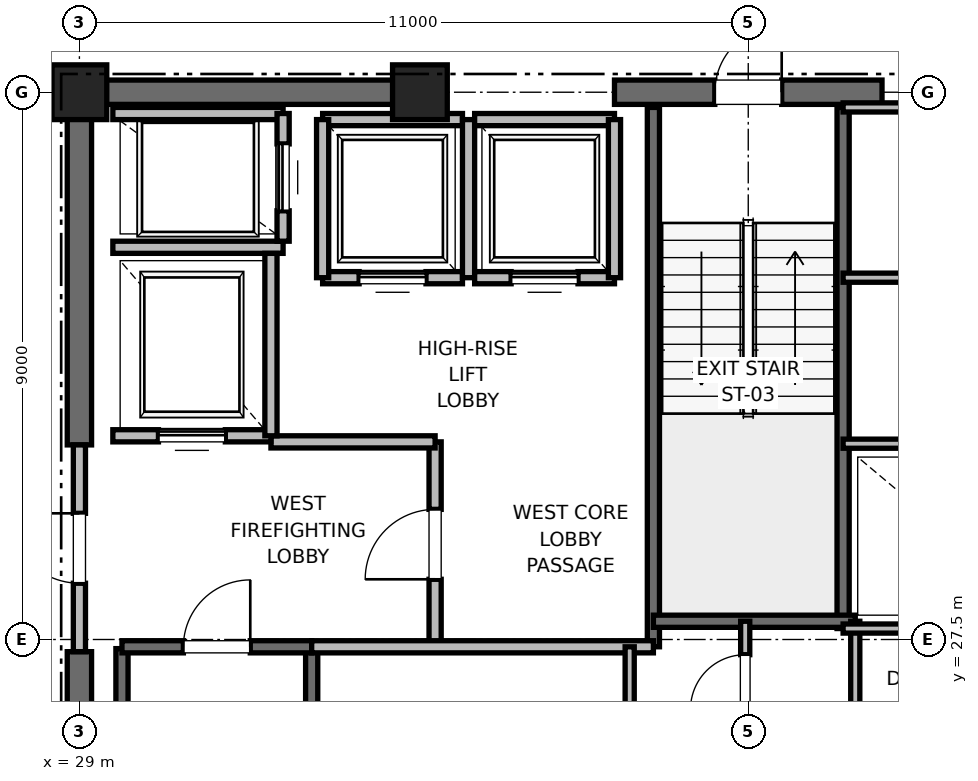
"""IFC4 building model, lengths in metres.
Left out: names, types, materials, properties, quantities, classifications, styles, units other than length and angle.
Written with IfcOpenShell. Run it as: python <this file> out.ifc"""

import sys

from ifc_helpers import new_model, si_unit, direction, frame, frame_2d, origin, origin_2d, place, context, subcontext, project, spatial, rectangle, extrude, element, fill, save


model = new_model("IFC4")
c1 = context("Model", 3, precision=1e-05, world=origin(), true_north=direction((0.0, 1.0)))
c2 = subcontext(c1, "Body", "Model", "MODEL_VIEW")
j1 = project(units=[si_unit("LENGTHUNIT", "METRE"), si_unit("PLANEANGLEUNIT", "RADIAN")], contexts=[c1])
p1 = place(None, origin())
s1 = spatial("IfcSite", under=j1, at=p1, CompositionType="ELEMENT")
p2 = place(p1, origin())
s2 = spatial("IfcBuilding", under=s1, at=p2, CompositionType="ELEMENT")
p3 = place(p2, frame((0.0, 0.0, 322.8)))
s3 = spatial("IfcBuildingStorey", under=s2, at=p3, CompositionType="ELEMENT", Elevation=322.8)
for number, where, z_axis, x_axis in (
    (1, (29.0, 36.5, 0.0), (0.0, 0.0, 1.0), (1.0, 0.0, 0.0)),
    (2, (34.6, 36.5, 0.0), (0.0, 0.0, 1.0), (1.0, 0.0, 0.0)),
):
    element("IfcColumn", number, at=place(p3, frame(where, z_axis=z_axis, x_axis=x_axis)), inside=s3, PredefinedType="PILASTER", context=c2, shape_type="SweptSolid", body=[
        extrude(rectangle(XDim=0.9, YDim=0.9, at=origin_2d()), origin(), (0.0, 0.0, 1.0), 4.0),
    ])
p4 = place(p3, frame((29.0, 36.5, 0.0), z_axis=(0.0, 0.0, 1.0), x_axis=(1.0, 0.0, 0.0)))
e3 = element("IfcWall", 3, at=p4, inside=s3, PredefinedType="SHEAR", context=c2, shape_type="SweptSolid", body=[
    extrude(rectangle(XDim=5.8, YDim=0.4, at=frame_2d((2.9, 0.0))), origin(), (0.0, 0.0, 1.0), 3.785),
])
p5 = place(p3, frame((37.8, 36.5, 0.0), z_axis=(0.0, 0.0, 1.0), x_axis=(1.0, 0.0, 0.0)))
e4 = element("IfcWall", 4, at=p5, inside=s3, PredefinedType="SHEAR", context=c2, shape_type="SweptSolid", body=[
    extrude(rectangle(XDim=4.4, YDim=0.4, at=frame_2d((2.2, 0.0))), origin(), (0.0, 0.0, 1.0), 3.785),
])
p6 = place(p5, frame((1.65, 0.0, 0.0)))
e5 = element("IfcOpeningElement", 5, at=p6, cuts=e4, PredefinedType="OPENING", context=c2, shape_type="SweptSolid", body=[
    extrude(rectangle(XDim=1.1, YDim=2.15, at=frame_2d((0.55, 1.075))), frame((0.0, 0.2, 0.0), z_axis=(0.0, -1.0, 0.0), x_axis=(1.0, 0.0, 0.0)), (0.0, 0.0, 1.0), 0.4),
])
p7 = place(p3, frame((29.0, 18.5, 0.0), z_axis=(0.0, 0.0, 1.0), x_axis=(0.0, 1.0, 0.0)))
e6 = element("IfcWall", 6, at=p7, inside=s3, PredefinedType="SHEAR", context=c2, shape_type="SweptSolid", body=[
    extrude(rectangle(XDim=8.8, YDim=0.4, at=frame_2d((4.4, 0.0))), origin(), (0.0, 0.0, 1.0), 3.785),
])
p8 = place(p3, frame((29.0, 30.7, 0.0), z_axis=(0.0, 0.0, 1.0), x_axis=(0.0, 1.0, 0.0)))
e7 = element("IfcWall", 7, at=p8, inside=s3, PredefinedType="SHEAR", context=c2, shape_type="SweptSolid", body=[
    extrude(rectangle(XDim=5.8, YDim=0.4, at=frame_2d((2.9, 0.0))), origin(), (0.0, 0.0, 1.0), 3.785),
])
p9 = place(p3, frame((29.7, 19.2, 0.0), z_axis=(0.0, 0.0, 1.0), x_axis=(0.0, 1.0, 0.0)))
e8 = element("IfcWall", 8, at=p9, inside=s3, PredefinedType="SOLIDWALL", context=c2, shape_type="SweptSolid", body=[
    extrude(rectangle(XDim=8.15, YDim=0.2, at=frame_2d((4.075, 0.0))), origin(), (0.0, 0.0, 1.0), 3.785),
])
p10 = place(p3, frame((32.82, 18.6, 0.0), z_axis=(0.0, 0.0, 1.0), x_axis=(0.0, 1.0, 0.0)))
e9 = element("IfcWall", 9, at=p10, inside=s3, PredefinedType="SOLIDWALL", context=c2, shape_type="SweptSolid", body=[
    extrude(rectangle(XDim=8.78, YDim=0.2, at=frame_2d((4.39, 0.0))), origin(), (0.0, 0.0, 1.0), 3.785),
])
p11 = place(p3, frame((29.7, 27.38, 0.0), z_axis=(0.0, 0.0, 1.0), x_axis=(1.0, 0.0, 0.0)))
e10 = element("IfcWall", 10, at=p11, inside=s3, PredefinedType="SOLIDWALL", context=c2, shape_type="SweptSolid", body=[
    extrude(rectangle(XDim=3.12, YDim=0.2, at=frame_2d((1.56, 0.0))), origin(), (0.0, 0.0, 1.0), 3.785),
])
p12 = place(p11, frame((1.01, 0.0, 0.0)))
e11 = element("IfcOpeningElement", 11, at=p12, cuts=e10, PredefinedType="OPENING", context=c2, shape_type="SweptSolid", body=[
    extrude(rectangle(XDim=1.1, YDim=2.15, at=frame_2d((0.55, 1.075))), frame((0.0, 0.1, 0.0), z_axis=(0.0, -1.0, 0.0), x_axis=(1.0, 0.0, 0.0)), (0.0, 0.0, 1.0), 0.2),
])
p13 = place(p3, frame((38.44, 27.38, 0.0), z_axis=(0.0, 0.0, 1.0), x_axis=(0.0, 1.0, 0.0)))
e12 = element("IfcWall", 12, at=p13, inside=s3, PredefinedType="SOLIDWALL", context=c2, shape_type="SweptSolid", body=[
    extrude(rectangle(XDim=8.87, YDim=0.2, at=frame_2d((4.435, 0.0))), origin(), (0.0, 0.0, 1.0), 3.785),
])
p14 = place(p3, frame((41.56, 27.68, 0.0), z_axis=(0.0, 0.0, 1.0), x_axis=(0.0, 1.0, 0.0)))
e13 = element("IfcWall", 13, at=p14, inside=s3, PredefinedType="SOLIDWALL", context=c2, shape_type="SweptSolid", body=[
    extrude(rectangle(XDim=8.57, YDim=0.2, at=frame_2d((4.285, 0.0))), origin(), (0.0, 0.0, 1.0), 3.785),
])
p15 = place(p3, frame((38.44, 27.8, 0.0), z_axis=(0.0, 0.0, 1.0), x_axis=(1.0, 0.0, 0.0)))
e14 = element("IfcWall", 14, at=p15, inside=s3, PredefinedType="SOLIDWALL", context=c2, shape_type="SweptSolid", body=[
    extrude(rectangle(XDim=3.32, YDim=0.2, at=frame_2d((1.66, 0.0))), origin(), (0.0, 0.0, 1.0), 3.785),
])
p16 = place(p3, frame((34.85, 27.38, 0.0), z_axis=(0.0, 0.0, 1.0), x_axis=(0.0, 1.0, 0.0)))
e15 = element("IfcWall", 15, at=p16, inside=s3, PredefinedType="PARTITIONING", context=c2, shape_type="SweptSolid", body=[
    extrude(rectangle(XDim=3.37, YDim=0.2, at=frame_2d((1.685, 0.0))), origin(), (0.0, 0.0, 1.0), 3.785),
])
p17 = place(p16, frame((1.11, 0.0, 0.0)))
e16 = element("IfcOpeningElement", 16, at=p17, cuts=e15, PredefinedType="OPENING", context=c2, shape_type="SweptSolid", body=[
    extrude(rectangle(XDim=1.15, YDim=2.2, at=frame_2d((0.575, 1.1))), frame((0.0, 0.1, 0.0), z_axis=(0.0, -1.0, 0.0), x_axis=(1.0, 0.0, 0.0)), (0.0, 0.0, 1.0), 0.2),
])
p18 = place(p3, frame((29.0, 27.3, 0.0), z_axis=(0.0, 0.0, 1.0), x_axis=(0.0, 1.0, 0.0)))
e17 = element("IfcWall", 17, at=p18, inside=s3, PredefinedType="PARTITIONING", context=c2, shape_type="SweptSolid", body=[
    extrude(rectangle(XDim=3.4, YDim=0.2, at=frame_2d((1.7, 0.0))), origin(), (0.0, 0.0, 1.0), 2.865),
])
p19 = place(p18, frame((1.125, 0.0, 0.0)))
e18 = element("IfcOpeningElement", 18, at=p19, cuts=e17, PredefinedType="OPENING", context=c2, shape_type="SweptSolid", body=[
    extrude(rectangle(XDim=1.15, YDim=2.2, at=frame_2d((0.575, 1.1))), frame((0.0, 0.1, 0.0), z_axis=(0.0, -1.0, 0.0), x_axis=(1.0, 0.0, 0.0)), (0.0, 0.0, 1.0), 0.2),
])
p20 = place(p3, frame((32.82, 27.38, 0.0), z_axis=(0.0, 0.0, 1.0), x_axis=(1.0, 0.0, 0.0)))
e19 = element("IfcWall", 19, at=p20, inside=s3, PredefinedType="PARTITIONING", context=c2, shape_type="SweptSolid", body=[
    extrude(rectangle(XDim=5.62, YDim=0.2, at=frame_2d((2.81, 0.0))), origin(), (0.0, 0.0, 1.0), 3.785),
])
p21 = place(p3, frame((32.15, 30.75, 0.0), z_axis=(0.0, 0.0, 1.0), x_axis=(1.0, 0.0, 0.0)))
e20 = element("IfcWall", 20, at=p21, inside=s3, PredefinedType="PARTITIONING", context=c2, shape_type="SweptSolid", body=[
    extrude(rectangle(XDim=2.7, YDim=0.2, at=frame_2d((1.35, 0.0))), origin(), (0.0, 0.0, 1.0), 3.785),
])
p22 = place(p3, frame((29.55, 30.85, 0.0), z_axis=(0.0, 0.0, 1.0), x_axis=(1.0, 0.0, 0.0)))
e21 = element("IfcWall", 21, at=p22, inside=s3, PredefinedType="SOLIDWALL", context=c2, shape_type="SweptSolid", body=[
    extrude(rectangle(XDim=2.6, YDim=0.2, at=frame_2d((1.3, 0.0))), origin(), (0.0, 0.0, 1.0), 2.865),
])
p23 = place(p22, frame((0.75, 0.0, 0.0)))
e22 = element("IfcOpeningElement", 22, at=p23, cuts=e21, PredefinedType="OPENING", context=c2, shape_type="SweptSolid", body=[
    extrude(rectangle(XDim=1.1, YDim=2.2, at=frame_2d((0.55, 1.1))), frame((0.0, 0.1, 0.0), z_axis=(0.0, -1.0, 0.0), x_axis=(1.0, 0.0, 0.0)), (0.0, 0.0, 1.0), 0.2),
])
p24 = place(p3, frame((29.55, 33.95, 0.0), z_axis=(0.0, 0.0, 1.0), x_axis=(1.0, 0.0, 0.0)))
e23 = element("IfcWall", 23, at=p24, inside=s3, PredefinedType="SOLIDWALL", context=c2, shape_type="SweptSolid", body=[
    extrude(rectangle(XDim=2.8, YDim=0.2, at=frame_2d((1.4, 0.0))), origin(), (0.0, 0.0, 1.0), 3.785),
])
p25 = place(p3, frame((32.15, 30.85, 0.0), z_axis=(0.0, 0.0, 1.0), x_axis=(0.0, 1.0, 0.0)))
e24 = element("IfcWall", 24, at=p25, inside=s3, PredefinedType="SOLIDWALL", context=c2, shape_type="SweptSolid", body=[
    extrude(rectangle(XDim=3.0, YDim=0.2, at=frame_2d((1.5, 0.0))), origin(), (0.0, 0.0, 1.0), 3.785),
])
p26 = place(p3, frame((32.35, 36.15, 0.0), z_axis=(0.0, 0.0, 1.0), x_axis=(-1.0, 0.0, 0.0)))
e25 = element("IfcWall", 25, at=p26, inside=s3, PredefinedType="SOLIDWALL", context=c2, shape_type="SweptSolid", body=[
    extrude(rectangle(XDim=2.8, YDim=0.2, at=frame_2d((1.4, 0.0))), origin(), (0.0, 0.0, 1.0), 3.22),
])
p27 = place(p3, frame((32.35, 34.05, 0.0), z_axis=(0.0, 0.0, 1.0), x_axis=(0.0, 1.0, 0.0)))
e26 = element("IfcWall", 26, at=p27, inside=s3, PredefinedType="SOLIDWALL", context=c2, shape_type="SweptSolid", body=[
    extrude(rectangle(XDim=2.1, YDim=0.2, at=frame_2d((1.05, 0.0))), origin(), (0.0, 0.0, 1.0), 3.785),
])
p28 = place(p27, frame((0.5, 0.0, 0.0)))
e27 = element("IfcOpeningElement", 27, at=p28, cuts=e26, PredefinedType="OPENING", context=c2, shape_type="SweptSolid", body=[
    extrude(rectangle(XDim=1.1, YDim=2.2, at=frame_2d((0.55, 1.1))), frame((0.0, 0.1, 0.0), z_axis=(0.0, -1.0, 0.0), x_axis=(1.0, 0.0, 0.0)), (0.0, 0.0, 1.0), 0.2),
])
p29 = place(p3, frame((33.0, 33.45, 0.0), z_axis=(0.0, 0.0, 1.0), x_axis=(1.0, 0.0, 0.0)))
e28 = element("IfcWall", 28, at=p29, inside=s3, PredefinedType="SOLIDWALL", context=c2, shape_type="SweptSolid", body=[
    extrude(rectangle(XDim=2.3, YDim=0.2, at=frame_2d((1.15, 0.0))), origin(), (0.0, 0.0, 1.0), 3.785),
])
p30 = place(p29, frame((0.6, 0.0, 0.0)))
e29 = element("IfcOpeningElement", 29, at=p30, cuts=e28, PredefinedType="OPENING", context=c2, shape_type="SweptSolid", body=[
    extrude(rectangle(XDim=1.1, YDim=2.2, at=frame_2d((0.55, 1.1))), frame((0.0, 0.1, 0.0), z_axis=(0.0, -1.0, 0.0), x_axis=(1.0, 0.0, 0.0)), (0.0, 0.0, 1.0), 0.2),
])
p31 = place(p3, frame((35.3, 36.05, 0.0), z_axis=(0.0, 0.0, 1.0), x_axis=(-1.0, 0.0, 0.0)))
e30 = element("IfcWall", 30, at=p31, inside=s3, PredefinedType="SOLIDWALL", context=c2, shape_type="SweptSolid", body=[
    extrude(rectangle(XDim=2.3, YDim=0.2, at=frame_2d((1.15, 0.0))), origin(), (0.0, 0.0, 1.0), 2.865),
])
p32 = place(p3, frame((33.0, 36.05, 0.0), z_axis=(0.0, 0.0, 1.0), x_axis=(0.0, -1.0, 0.0)))
e31 = element("IfcWall", 31, at=p32, inside=s3, PredefinedType="SOLIDWALL", context=c2, shape_type="SweptSolid", body=[
    extrude(rectangle(XDim=2.6, YDim=0.2, at=frame_2d((1.3, 0.0))), origin(), (0.0, 0.0, 1.0), 3.785),
])
p33 = place(p3, frame((35.4, 33.45, 0.0), z_axis=(0.0, 0.0, 1.0), x_axis=(0.0, 1.0, 0.0)))
e32 = element("IfcWall", 32, at=p33, inside=s3, PredefinedType="SOLIDWALL", context=c2, shape_type="SweptSolid", body=[
    extrude(rectangle(XDim=2.6, YDim=0.2, at=frame_2d((1.3, 0.0))), origin(), (0.0, 0.0, 1.0), 2.865),
])
p34 = place(p3, frame((35.5, 33.45, 0.0), z_axis=(0.0, 0.0, 1.0), x_axis=(1.0, 0.0, 0.0)))
e33 = element("IfcWall", 33, at=p34, inside=s3, PredefinedType="SOLIDWALL", context=c2, shape_type="SweptSolid", body=[
    extrude(rectangle(XDim=2.3, YDim=0.2, at=frame_2d((1.15, 0.0))), origin(), (0.0, 0.0, 1.0), 3.785),
])
p35 = place(p34, frame((0.6, 0.0, 0.0)))
e34 = element("IfcOpeningElement", 34, at=p35, cuts=e33, PredefinedType="OPENING", context=c2, shape_type="SweptSolid", body=[
    extrude(rectangle(XDim=1.1, YDim=2.2, at=frame_2d((0.55, 1.1))), frame((0.0, 0.1, 0.0), z_axis=(0.0, -1.0, 0.0), x_axis=(1.0, 0.0, 0.0)), (0.0, 0.0, 1.0), 0.2),
])
p36 = place(p3, frame((37.8, 36.05, 0.0), z_axis=(0.0, 0.0, 1.0), x_axis=(-1.0, 0.0, 0.0)))
e35 = element("IfcWall", 35, at=p36, inside=s3, PredefinedType="SOLIDWALL", context=c2, shape_type="SweptSolid", body=[
    extrude(rectangle(XDim=2.3, YDim=0.2, at=frame_2d((1.15, 0.0))), origin(), (0.0, 0.0, 1.0), 2.865),
])
p37 = place(p3, frame((37.8, 33.45, 0.0), z_axis=(0.0, 0.0, 1.0), x_axis=(0.0, 1.0, 0.0)))
e36 = element("IfcWall", 36, at=p37, inside=s3, PredefinedType="SOLIDWALL", context=c2, shape_type="SweptSolid", body=[
    extrude(rectangle(XDim=2.6, YDim=0.2, at=frame_2d((1.3, 0.0))), origin(), (0.0, 0.0, 1.0), 2.865),
])
p38 = place(p3, frame((41.76, 23.8, 0.0), z_axis=(0.0, 0.0, 1.0), x_axis=(0.0, 1.0, 0.0)))
e37 = element("IfcWall", 37, at=p38, inside=s3, PredefinedType="PARTITIONING", context=c2, shape_type="SweptSolid", body=[
    extrude(rectangle(XDim=4.0, YDim=0.15, at=frame_2d((2.0, 0.0))), origin(), (0.0, 0.0, 1.0), 2.85),
])
p39 = place(p3, frame((39.95, 25.8, 0.0), z_axis=(0.0, 0.0, 1.0), x_axis=(0.0, 1.0, 0.0)))
e38 = element("IfcWall", 38, at=p39, inside=s3, PredefinedType="PARTITIONING", context=c2, shape_type="SweptSolid", body=[
    extrude(rectangle(XDim=2.0, YDim=0.15, at=frame_2d((1.0, 0.0))), origin(), (0.0, 0.0, 1.0), 2.85),
])
p40 = place(p39, frame((0.55, 0.0, 0.0)))
e39 = element("IfcOpeningElement", 39, at=p40, cuts=e38, PredefinedType="OPENING", context=c2, shape_type="SweptSolid", body=[
    extrude(rectangle(XDim=0.9, YDim=2.1, at=frame_2d((0.45, 1.05))), frame((0.0, 0.075, 0.0), z_axis=(0.0, -1.0, 0.0), x_axis=(1.0, 0.0, 0.0)), (0.0, 0.0, 1.0), 0.15),
])
p41 = place(p3, frame((38.05, 18.6, 0.0), z_axis=(0.0, 0.0, 1.0), x_axis=(0.0, 1.0, 0.0)))
e40 = element("IfcWall", 40, at=p41, inside=s3, PredefinedType="PARTITIONING", context=c2, shape_type="SweptSolid", body=[
    extrude(rectangle(XDim=8.78, YDim=0.15, at=frame_2d((4.39, 0.0))), origin(), (0.0, 0.0, 1.0), 2.85),
])
p42 = place(p41, frame((3.89, 0.0, 0.0)))
e41 = element("IfcOpeningElement", 41, at=p42, cuts=e40, PredefinedType="OPENING", context=c2, shape_type="SweptSolid", body=[
    extrude(rectangle(XDim=1.0, YDim=2.15, at=frame_2d((0.5, 1.075))), frame((0.0, 0.075, 0.0), z_axis=(0.0, -1.0, 0.0), x_axis=(1.0, 0.0, 0.0)), (0.0, 0.0, 1.0), 0.15),
])
p43 = place(p3, frame((41.56, 27.68, 0.0), z_axis=(0.0, 0.0, 1.0), x_axis=(1.0, 0.0, 0.0)))
e42 = element("IfcWall", 42, at=p43, inside=s3, PredefinedType="PARTITIONING", context=c2, shape_type="SweptSolid", body=[
    extrude(rectangle(XDim=3.59, YDim=0.15, at=frame_2d((1.795, 0.0))), origin(), (0.0, 0.0, 1.0), 2.85),
])
p44 = place(p3, frame((41.56, 30.72, 0.0), z_axis=(0.0, 0.0, 1.0), x_axis=(1.0, 0.0, 0.0)))
e43 = element("IfcWall", 43, at=p44, inside=s3, PredefinedType="PARTITIONING", context=c2, shape_type="SweptSolid", body=[
    extrude(rectangle(XDim=3.59, YDim=0.15, at=frame_2d((1.795, 0.0))), origin(), (0.0, 0.0, 1.0), 2.85),
])
p45 = place(p44, frame((1.355, 0.0, 0.0)))
e44 = element("IfcOpeningElement", 44, at=p45, cuts=e43, PredefinedType="OPENING", context=c2, shape_type="SweptSolid", body=[
    extrude(rectangle(XDim=0.88, YDim=2.1, at=frame_2d((0.44, 1.05))), frame((0.0, 0.075, 0.0), z_axis=(0.0, -1.0, 0.0), x_axis=(1.0, 0.0, 0.0)), (0.0, 0.0, 1.0), 0.15),
])
p46 = place(p3, frame((41.56, 36.25, 0.0), z_axis=(0.0, 0.0, 1.0), x_axis=(1.0, 0.0, 0.0)))
e45 = element("IfcWall", 45, at=p46, inside=s3, PredefinedType="PARTITIONING", context=c2, shape_type="SweptSolid", body=[
    extrude(rectangle(XDim=2.94, YDim=0.15, at=frame_2d((1.47, 0.0))), origin(), (0.0, 0.0, 1.0), 2.85),
])
p47 = place(p3, frame((41.56, 33.45, 0.0), z_axis=(0.0, 0.0, 1.0), x_axis=(1.0, 0.0, 0.0)))
e46 = element("IfcWall", 46, at=p47, inside=s3, PredefinedType="PARTITIONING", context=c2, shape_type="SweptSolid", body=[
    extrude(rectangle(XDim=2.94, YDim=0.15, at=frame_2d((1.47, 0.0))), origin(), (0.0, 0.0, 1.0), 2.85),
])
p48 = place(p47, frame((1.03, 0.0, 0.0)))
e47 = element("IfcOpeningElement", 47, at=p48, cuts=e46, PredefinedType="OPENING", context=c2, shape_type="SweptSolid", body=[
    extrude(rectangle(XDim=0.88, YDim=2.1, at=frame_2d((0.44, 1.05))), frame((0.0, 0.075, 0.0), z_axis=(0.0, -1.0, 0.0), x_axis=(1.0, 0.0, 0.0)), (0.0, 0.0, 1.0), 0.15),
])
p49 = place(p12, origin())
e48 = element("IfcDoor", 48, at=p49, inside=s3, OperationType="SINGLE_SWING_RIGHT", PredefinedType="DOOR", context=c2, shape_type="SweptSolid", body=[
    extrude(rectangle(XDim=1.1, YDim=2.15, at=frame_2d((0.55, 1.075))), frame((0.0, 0.025, 0.0), z_axis=(0.0, -1.0, 0.0), x_axis=(1.0, 0.0, 0.0)), (0.0, 0.0, 1.0), 0.05),
])
fill(e11, e48)
p50 = place(p6, origin())
e49 = element("IfcDoor", 49, at=p50, inside=s3, OperationType="SINGLE_SWING_RIGHT", PredefinedType="DOOR", context=c2, shape_type="SweptSolid", body=[
    extrude(rectangle(XDim=1.1, YDim=2.15, at=frame_2d((0.55, 1.075))), frame((0.0, 0.025, 0.0), z_axis=(0.0, -1.0, 0.0), x_axis=(1.0, 0.0, 0.0)), (0.0, 0.0, 1.0), 0.05),
])
fill(e5, e49)
p51 = place(p17, origin())
e50 = element("IfcDoor", 50, at=p51, inside=s3, OperationType="SINGLE_SWING_LEFT", PredefinedType="DOOR", context=c2, shape_type="SweptSolid", body=[
    extrude(rectangle(XDim=1.15, YDim=2.2, at=frame_2d((0.575, 1.1))), frame((0.0, 0.025, 0.0), z_axis=(0.0, -1.0, 0.0), x_axis=(1.0, 0.0, 0.0)), (0.0, 0.0, 1.0), 0.05),
])
fill(e16, e50)
p52 = place(p19, origin())
e51 = element("IfcDoor", 51, at=p52, inside=s3, OperationType="SINGLE_SWING_RIGHT", PredefinedType="DOOR", context=c2, shape_type="SweptSolid", body=[
    extrude(rectangle(XDim=1.15, YDim=2.2, at=frame_2d((0.575, 1.1))), frame((0.0, 0.025, 0.0), z_axis=(0.0, -1.0, 0.0), x_axis=(1.0, 0.0, 0.0)), (0.0, 0.0, 1.0), 0.05),
])
fill(e18, e51)
p53 = place(p23, origin())
e52 = element("IfcDoor", 52, at=p53, inside=s3, OperationType="SLIDING_TO_RIGHT", PredefinedType="DOOR", context=c2, shape_type="SweptSolid", body=[
    extrude(rectangle(XDim=1.1, YDim=2.2, at=frame_2d((0.55, 1.1))), frame((0.0, 0.025, 0.0), z_axis=(0.0, -1.0, 0.0), x_axis=(1.0, 0.0, 0.0)), (0.0, 0.0, 1.0), 0.05),
])
fill(e22, e52)
p54 = place(p28, origin())
e53 = element("IfcDoor", 53, at=p54, inside=s3, OperationType="SLIDING_TO_RIGHT", PredefinedType="DOOR", context=c2, shape_type="SweptSolid", body=[
    extrude(rectangle(XDim=1.1, YDim=2.2, at=frame_2d((0.55, 1.1))), frame((0.0, 0.025, 0.0), z_axis=(0.0, -1.0, 0.0), x_axis=(1.0, 0.0, 0.0)), (0.0, 0.0, 1.0), 0.05),
])
fill(e27, e53)
p55 = place(p30, origin())
e54 = element("IfcDoor", 54, at=p55, inside=s3, OperationType="SLIDING_TO_RIGHT", PredefinedType="DOOR", context=c2, shape_type="SweptSolid", body=[
    extrude(rectangle(XDim=1.1, YDim=2.2, at=frame_2d((0.55, 1.1))), frame((0.0, 0.025, 0.0), z_axis=(0.0, -1.0, 0.0), x_axis=(1.0, 0.0, 0.0)), (0.0, 0.0, 1.0), 0.05),
])
fill(e29, e54)
p56 = place(p35, origin())
e55 = element("IfcDoor", 55, at=p56, inside=s3, OperationType="SLIDING_TO_RIGHT", PredefinedType="DOOR", context=c2, shape_type="SweptSolid", body=[
    extrude(rectangle(XDim=1.1, YDim=2.2, at=frame_2d((0.55, 1.1))), frame((0.0, 0.025, 0.0), z_axis=(0.0, -1.0, 0.0), x_axis=(1.0, 0.0, 0.0)), (0.0, 0.0, 1.0), 0.05),
])
fill(e34, e55)
p57 = place(p40, origin())
e56 = element("IfcDoor", 56, at=p57, inside=s3, OperationType="SINGLE_SWING_LEFT", PredefinedType="DOOR", context=c2, shape_type="SweptSolid", body=[
    extrude(rectangle(XDim=0.9, YDim=2.1, at=frame_2d((0.45, 1.05))), frame((0.0, 0.025, 0.0), z_axis=(0.0, -1.0, 0.0), x_axis=(1.0, 0.0, 0.0)), (0.0, 0.0, 1.0), 0.05),
])
fill(e39, e56)
save(model, sys.argv[1])
